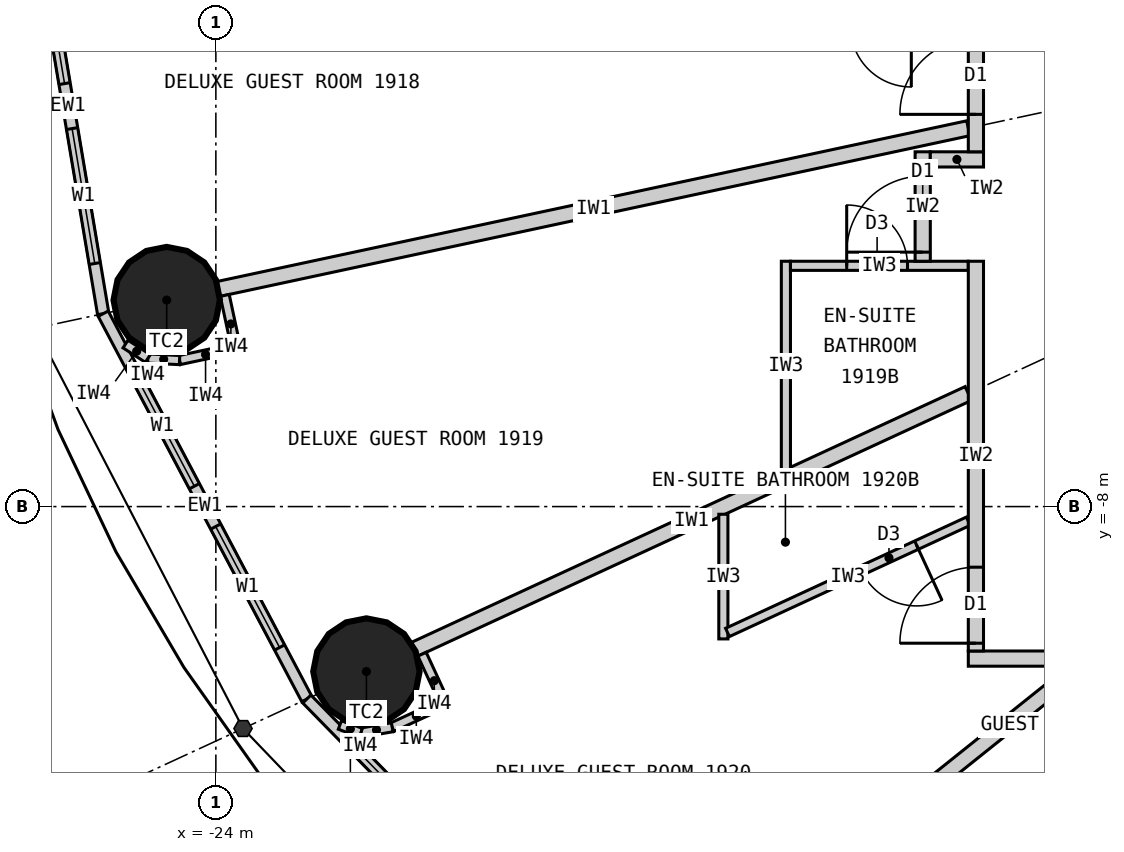
"""IFC4 building model, lengths in metres.
Left out: names, types, materials, properties, quantities, classifications, styles, units other than length and angle.
Written with IfcOpenShell. Run it as: python <this file> out.ifc"""

import sys

from ifc_helpers import new_model, si_unit, direction, frame, frame_2d, origin, origin_2d, place, context, subcontext, project, spatial, rectangle, circle, extrude, element, fill, save


model = new_model("IFC4")
c1 = context("Model", 3, precision=1e-05, world=origin(), true_north=direction((0.0, 1.0)))
c2 = subcontext(c1, "Body", "Model", "MODEL_VIEW")
j1 = project(units=[si_unit("LENGTHUNIT", "METRE"), si_unit("PLANEANGLEUNIT", "RADIAN")], contexts=[c1])
p1 = place(None, origin())
s1 = spatial("IfcSite", under=j1, at=p1, CompositionType="ELEMENT")
p2 = place(p1, origin())
s2 = spatial("IfcBuilding", under=s1, at=p2, CompositionType="ELEMENT")
p3 = place(p2, frame((0.0, 0.0, 77.1)))
s3 = spatial("IfcBuildingStorey", under=s2, at=p3, CompositionType="ELEMENT", Elevation=77.1)
for number, where, z_axis, x_axis in (
    (1, (-24.647, -5.283, 0.0), (0.0, 0.0, 1.0), (1.0, 0.0, 0.0)),
    (2, (-22.019, -10.17, 0.0), (0.0, 0.0, 1.0), (1.0, 0.0, 0.0)),
):
    element("IfcColumn", number, at=place(p3, frame(where, z_axis=z_axis, x_axis=x_axis)), inside=s3, PredefinedType="COLUMN", context=c2, shape_type="SweptSolid", body=[
        extrude(circle(Radius=0.7, at=origin_2d()), origin(), (0.0, 0.0, 1.0), 3.3),
    ])
p4 = place(p3, frame((-26.4, 0.0, 0.0), z_axis=(0.0, 0.0, 1.0), x_axis=(0.165642551694, -0.986185857264, 0.0)))
e3 = element("IfcWall", 3, at=p4, inside=s3, PredefinedType="ELEMENTEDWALL", context=c2, shape_type="SweptSolid", body=[
    extrude(rectangle(XDim=5.539, YDim=0.15, at=frame_2d((2.77, 0.0))), origin(), (0.0, 0.0, 1.0), 3.12),
])
p5 = place(p4, frame((0.669, 0.0, 0.9)))
e4 = element("IfcOpeningElement", 4, at=p5, cuts=e3, PredefinedType="OPENING", context=c2, shape_type="SweptSolid", body=[
    extrude(rectangle(XDim=1.8, YDim=1.9, at=frame_2d((0.9, 0.95))), frame((0.0, 0.085, 0.0), z_axis=(0.0, -1.0, 0.0), x_axis=(1.0, 0.0, 0.0)), (0.0, 0.0, 1.0), 0.17),
])
p6 = place(p4, frame((3.07, 0.0, 0.9)))
e5 = element("IfcOpeningElement", 5, at=p6, cuts=e3, PredefinedType="OPENING", context=c2, shape_type="SweptSolid", body=[
    extrude(rectangle(XDim=1.8, YDim=1.9, at=frame_2d((0.9, 0.95))), frame((0.0, 0.085, 0.0), z_axis=(0.0, -1.0, 0.0), x_axis=(1.0, 0.0, 0.0)), (0.0, 0.0, 1.0), 0.17),
])
p7 = place(p3, frame((-25.482, -5.462, 0.0), z_axis=(0.0, 0.0, 1.0), x_axis=(0.467296867008, -0.884100468321, 0.0)))
e6 = element("IfcWall", 6, at=p7, inside=s3, PredefinedType="ELEMENTEDWALL", context=c2, shape_type="SweptSolid", body=[
    extrude(rectangle(XDim=5.734, YDim=0.15, at=frame_2d((2.867, 0.0))), origin(), (0.0, 0.0, 1.0), 3.12),
])
p8 = place(p7, frame((0.767, 0.0, 0.9)))
e7 = element("IfcOpeningElement", 7, at=p8, cuts=e6, PredefinedType="OPENING", context=c2, shape_type="SweptSolid", body=[
    extrude(rectangle(XDim=1.8, YDim=1.9, at=frame_2d((0.9, 0.95))), frame((0.0, 0.085, 0.0), z_axis=(0.0, -1.0, 0.0), x_axis=(1.0, 0.0, 0.0)), (0.0, 0.0, 1.0), 0.17),
])
p9 = place(p7, frame((3.167, 0.0, 0.9)))
e8 = element("IfcOpeningElement", 8, at=p9, cuts=e6, PredefinedType="OPENING", context=c2, shape_type="SweptSolid", body=[
    extrude(rectangle(XDim=1.8, YDim=1.9, at=frame_2d((0.9, 0.95))), frame((0.0, 0.085, 0.0), z_axis=(0.0, -1.0, 0.0), x_axis=(1.0, 0.0, 0.0)), (0.0, 0.0, 1.0), 0.17),
])
p10 = place(p3, frame((-22.803, -10.532, 0.0), z_axis=(0.0, 0.0, 1.0), x_axis=(0.699602905915, -0.714531856557, 0.0)))
e9 = element("IfcWall", 9, at=p10, inside=s3, PredefinedType="ELEMENTEDWALL", context=c2, shape_type="SweptSolid", body=[
    extrude(rectangle(XDim=6.051, YDim=0.15, at=frame_2d((3.025, 0.0))), origin(), (0.0, 0.0, 1.0), 3.12),
])
p11 = place(p10, frame((0.926, 0.0, 0.9)))
e10 = element("IfcOpeningElement", 10, at=p11, cuts=e9, PredefinedType="OPENING", context=c2, shape_type="SweptSolid", body=[
    extrude(rectangle(XDim=1.8, YDim=1.9, at=frame_2d((0.9, 0.95))), frame((0.0, 0.085, 0.0), z_axis=(0.0, -1.0, 0.0), x_axis=(1.0, 0.0, 0.0)), (0.0, 0.0, 1.0), 0.17),
])
p12 = place(p10, frame((3.325, 0.0, 0.9)))
e11 = element("IfcOpeningElement", 11, at=p12, cuts=e9, PredefinedType="OPENING", context=c2, shape_type="SweptSolid", body=[
    extrude(rectangle(XDim=1.8, YDim=1.9, at=frame_2d((0.9, 0.95))), frame((0.0, 0.085, 0.0), z_axis=(0.0, -1.0, 0.0), x_axis=(1.0, 0.0, 0.0)), (0.0, 0.0, 1.0), 0.17),
])
p13 = place(p3, frame((14.1, -10.0, 0.0), z_axis=(0.0, 0.0, 1.0), x_axis=(-1.0, 0.0, 0.0)))
e12 = element("IfcWall", 12, at=p13, inside=s3, PredefinedType="PARTITIONING", context=c2, shape_type="SweptSolid", body=[
    extrude(rectangle(XDim=28.2, YDim=0.2, at=frame_2d((14.1, 0.0))), origin(), (0.0, 0.0, 1.0), 3.12),
])
p14 = place(p13, frame((24.165, 0.0, 0.0)))
e13 = element("IfcOpeningElement", 13, at=p14, cuts=e12, PredefinedType="OPENING", context=c2, shape_type="SweptSolid", body=[
    extrude(rectangle(XDim=1.0, YDim=2.2, at=frame_2d((0.5, 1.1))), frame((0.0, 0.11, 0.0), z_axis=(0.0, -1.0, 0.0), x_axis=(1.0, 0.0, 0.0)), (0.0, 0.0, 1.0), 0.22),
])
p15 = place(p13, frame((14.923, 0.0, 0.0)))
e14 = element("IfcOpeningElement", 14, at=p15, cuts=e12, PredefinedType="OPENING", context=c2, shape_type="SweptSolid", body=[
    extrude(rectangle(XDim=1.0, YDim=2.2, at=frame_2d((0.5, 1.1))), frame((0.0, 0.11, 0.0), z_axis=(0.0, -1.0, 0.0), x_axis=(1.0, 0.0, 0.0)), (0.0, 0.0, 1.0), 0.22),
])
p16 = place(p13, frame((3.035, 0.0, 0.0)))
e15 = element("IfcOpeningElement", 15, at=p16, cuts=e12, PredefinedType="OPENING", context=c2, shape_type="SweptSolid", body=[
    extrude(rectangle(XDim=1.0, YDim=2.2, at=frame_2d((0.5, 1.1))), frame((0.0, 0.11, 0.0), z_axis=(0.0, -1.0, 0.0), x_axis=(1.0, 0.0, 0.0)), (0.0, 0.0, 1.0), 0.22),
])
p17 = place(p3, frame((-14.1, -3.022, 0.0), z_axis=(0.0, 0.0, 1.0), x_axis=(-0.977790014929, -0.209586943072, 0.0)))
e16 = element("IfcWall", 16, at=p17, inside=s3, PredefinedType="PARTITIONING", context=c2, shape_type="SweptSolid", body=[
    extrude(rectangle(XDim=10.087, YDim=0.2, at=frame_2d((5.043, 0.0))), origin(), (0.0, 0.0, 1.0), 2.32),
])
p18 = place(p3, frame((-14.1, -6.512, 0.0), z_axis=(0.0, 0.0, 1.0), x_axis=(-0.907832871056, -0.419332181247, 0.0)))
e17 = element("IfcWall", 17, at=p18, inside=s3, PredefinedType="PARTITIONING", context=c2, shape_type="SweptSolid", body=[
    extrude(rectangle(XDim=8.023, YDim=0.2, at=frame_2d((4.011, 0.0))), origin(), (0.0, 0.0, 1.0), 2.32),
])
p19 = place(p3, frame((-12.625, -10.1, 0.0), z_axis=(0.0, 0.0, 1.0), x_axis=(-0.780892451574, -0.624665493744, 0.0)))
e18 = element("IfcWall", 18, at=p19, inside=s3, PredefinedType="PARTITIONING", context=c2, shape_type="SweptSolid", body=[
    extrude(rectangle(XDim=6.045, YDim=0.2, at=frame_2d((3.022, 0.0))), origin(), (0.0, 0.0, 1.0), 2.32),
])
p20 = place(p3, frame((-16.5, -7.521, 0.0), z_axis=(0.0, 0.0, 1.0), x_axis=(0.0, 1.0, 0.0)))
e19 = element("IfcWall", 19, at=p20, inside=s3, PredefinedType="PARTITIONING", context=c2, shape_type="SweptSolid", body=[
    extrude(rectangle(XDim=2.749, YDim=0.12, at=frame_2d((1.374, 0.0))), origin(), (0.0, 0.0, 1.0), 3.12),
])
p21 = place(p3, frame((-14.1, -4.833, 0.0), z_axis=(0.0, 0.0, 1.0), x_axis=(-1.0, 0.0, 0.0)))
e20 = element("IfcWall", 20, at=p21, inside=s3, PredefinedType="PARTITIONING", context=c2, shape_type="SweptSolid", body=[
    extrude(rectangle(XDim=2.34, YDim=0.12, at=frame_2d((1.17, 0.0))), origin(), (0.0, 0.0, 1.0), 3.12),
])
p22 = place(p21, frame((0.8, 0.0, 0.0)))
e21 = element("IfcOpeningElement", 21, at=p22, cuts=e20, PredefinedType="OPENING", context=c2, shape_type="SweptSolid", body=[
    extrude(rectangle(XDim=0.8, YDim=2.1, at=frame_2d((0.4, 1.05))), frame((0.0, 0.07, 0.0), z_axis=(0.0, -1.0, 0.0), x_axis=(1.0, 0.0, 0.0)), (0.0, 0.0, 1.0), 0.14),
])
p23 = place(p3, frame((-17.323, -8.101, 0.0), z_axis=(0.0, 0.0, 1.0), x_axis=(0.0, -1.0, 0.0)))
e22 = element("IfcWall", 22, at=p23, inside=s3, PredefinedType="PARTITIONING", context=c2, shape_type="SweptSolid", body=[
    extrude(rectangle(XDim=1.64, YDim=0.12, at=frame_2d((0.82, 0.0))), origin(), (0.0, 0.0, 1.0), 3.12),
])
p24 = place(p3, frame((-14.1, -8.193, 0.0), z_axis=(0.0, 0.0, 1.0), x_axis=(-0.907836493557, -0.419324338628, 0.0)))
e23 = element("IfcWall", 23, at=p24, inside=s3, PredefinedType="PARTITIONING", context=c2, shape_type="SweptSolid", body=[
    extrude(rectangle(XDim=3.49, YDim=0.12, at=frame_2d((1.745, 0.0))), origin(), (0.0, 0.0, 1.0), 3.12),
])
p25 = place(p24, frame((0.75, 0.0, 0.0)))
e24 = element("IfcOpeningElement", 24, at=p25, cuts=e23, PredefinedType="OPENING", context=c2, shape_type="SweptSolid", body=[
    extrude(rectangle(XDim=0.8, YDim=2.1, at=frame_2d((0.4, 1.05))), frame((0.0, 0.07, 0.0), z_axis=(0.0, -1.0, 0.0), x_axis=(1.0, 0.0, 0.0)), (0.0, 0.0, 1.0), 0.14),
])
p26 = place(p3, frame((-14.7, -3.333, 0.0), z_axis=(0.0, 0.0, 1.0), x_axis=(0.0, -1.0, 0.0)))
e25 = element("IfcWall", 25, at=p26, inside=s3, PredefinedType="PARTITIONING", context=c2, shape_type="SweptSolid", body=[
    extrude(rectangle(XDim=1.44, YDim=0.2, at=frame_2d((0.72, 0.0))), origin(), (0.0, 0.0, 1.0), 3.12),
])
p27 = place(p26, frame((0.32, 0.0, 0.0)))
e26 = element("IfcOpeningElement", 26, at=p27, cuts=e25, PredefinedType="OPENING", context=c2, shape_type="SweptSolid", body=[
    extrude(rectangle(XDim=1.0, YDim=2.2, at=frame_2d((0.5, 1.1))), frame((0.0, 0.11, 0.0), z_axis=(0.0, -1.0, 0.0), x_axis=(1.0, 0.0, 0.0)), (0.0, 0.0, 1.0), 0.22),
])
p28 = place(p3, frame((-13.9, -3.433, 0.0), z_axis=(0.0, 0.0, 1.0), x_axis=(-1.0, 0.0, 0.0)))
e27 = element("IfcWall", 27, at=p28, inside=s3, PredefinedType="PARTITIONING", context=c2, shape_type="SweptSolid", body=[
    extrude(rectangle(XDim=0.7, YDim=0.2, at=frame_2d((0.35, 0.0))), origin(), (0.0, 0.0, 1.0), 2.32),
])
p29 = place(p3, frame((-14.0, 3.333, 0.0), z_axis=(0.0, 0.0, 1.0), x_axis=(0.0, -1.0, 0.0)))
e28 = element("IfcWall", 28, at=p29, inside=s3, PredefinedType="PARTITIONING", context=c2, shape_type="SweptSolid", body=[
    extrude(rectangle(XDim=6.665, YDim=0.2, at=frame_2d((3.333, 0.0))), origin(), (0.0, 0.0, 1.0), 3.12),
])
p30 = place(p29, frame((2.15, 0.0, 0.0)))
e29 = element("IfcOpeningElement", 29, at=p30, cuts=e28, PredefinedType="OPENING", context=c2, shape_type="SweptSolid", body=[
    extrude(rectangle(XDim=1.0, YDim=2.2, at=frame_2d((0.5, 1.1))), frame((0.0, 0.11, 0.0), z_axis=(0.0, -1.0, 0.0), x_axis=(1.0, 0.0, 0.0)), (0.0, 0.0, 1.0), 0.22),
])
p31 = place(p29, frame((5.173, 0.0, 0.0)))
e30 = element("IfcOpeningElement", 30, at=p31, cuts=e28, PredefinedType="OPENING", context=c2, shape_type="SweptSolid", body=[
    extrude(rectangle(XDim=1.0, YDim=2.2, at=frame_2d((0.5, 1.1))), frame((0.0, 0.11, 0.0), z_axis=(0.0, -1.0, 0.0), x_axis=(1.0, 0.0, 0.0)), (0.0, 0.0, 1.0), 0.22),
])
p32 = place(p3, frame((-14.0, -4.772, 0.0), z_axis=(0.0, 0.0, 1.0), x_axis=(0.0, -1.0, 0.0)))
e31 = element("IfcWall", 31, at=p32, inside=s3, PredefinedType="PARTITIONING", context=c2, shape_type="SweptSolid", body=[
    extrude(rectangle(XDim=5.127, YDim=0.2, at=frame_2d((2.564, 0.0))), origin(), (0.0, 0.0, 1.0), 3.12),
])
p33 = place(p32, frame((4.025, 0.0, 0.0)))
e32 = element("IfcOpeningElement", 32, at=p33, cuts=e31, PredefinedType="OPENING", context=c2, shape_type="SweptSolid", body=[
    extrude(rectangle(XDim=1.0, YDim=2.2, at=frame_2d((0.5, 1.1))), frame((0.0, 0.11, 0.0), z_axis=(0.0, -1.0, 0.0), x_axis=(1.0, 0.0, 0.0)), (0.0, 0.0, 1.0), 0.22),
])
p34 = place(p3, frame((-23.883, -5.222, 0.0), z_axis=(0.0, 0.0, 1.0), x_axis=(0.209311842415, -0.977848941619, 0.0)))
e33 = element("IfcWall", 33, at=p34, inside=s3, PredefinedType="PARTITIONING", context=c2, shape_type="SweptSolid", body=[
    extrude(rectangle(XDim=0.768, YDim=0.12, at=frame_2d((0.384, 0.0))), origin(), (0.0, 0.0, 1.0), 3.12),
])
p35 = place(p3, frame((-23.793, -5.926, 0.0), z_axis=(0.0, 0.0, 1.0), x_axis=(-0.977792206673, -0.209576717621, 0.0)))
e34 = element("IfcWall", 34, at=p35, inside=s3, PredefinedType="PARTITIONING", context=c2, shape_type="SweptSolid", body=[
    extrude(rectangle(XDim=0.7, YDim=0.12, at=frame_2d((0.35, 0.0))), origin(), (0.0, 0.0, 1.0), 3.12),
])
p36 = place(p3, frame((-24.478, -6.073, 0.0), z_axis=(0.0, 0.0, 1.0), x_axis=(-0.998708262812, 0.05081147302, 0.0)))
e35 = element("IfcWall", 35, at=p36, inside=s3, PredefinedType="PARTITIONING", context=c2, shape_type="SweptSolid", body=[
    extrude(rectangle(XDim=0.418, YDim=0.12, at=frame_2d((0.209, 0.0))), origin(), (0.0, 0.0, 1.0), 3.12),
])
p37 = place(p3, frame((-24.895, -6.052, 0.0), z_axis=(0.0, 0.0, 1.0), x_axis=(-0.839495197275, 0.54336710772, 0.0)))
e36 = element("IfcWall", 36, at=p37, inside=s3, PredefinedType="PARTITIONING", context=c2, shape_type="SweptSolid", body=[
    extrude(rectangle(XDim=0.35, YDim=0.12, at=frame_2d((0.175, 0.0))), origin(), (0.0, 0.0, 1.0), 3.12),
])
p38 = place(p3, frame((-21.287, -9.942, 0.0), z_axis=(0.0, 0.0, 1.0), x_axis=(0.419259891039, -0.907866258744, 0.0)))
e37 = element("IfcWall", 37, at=p38, inside=s3, PredefinedType="PARTITIONING", context=c2, shape_type="SweptSolid", body=[
    extrude(rectangle(XDim=0.768, YDim=0.12, at=frame_2d((0.384, 0.0))), origin(), (0.0, 0.0, 1.0), 3.12),
])
p39 = place(p3, frame((-21.045, -10.61, 0.0), z_axis=(0.0, 0.0, 1.0), x_axis=(-0.907877701396, -0.419235112208, 0.0)))
e38 = element("IfcWall", 38, at=p39, inside=s3, PredefinedType="PARTITIONING", context=c2, shape_type="SweptSolid", body=[
    extrude(rectangle(XDim=0.7, YDim=0.12, at=frame_2d((0.35, 0.0))), origin(), (0.0, 0.0, 1.0), 3.12),
])
p40 = place(p3, frame((-21.68, -10.903, 0.0), z_axis=(0.0, 0.0, 1.0), x_axis=(-0.985446622073, -0.169985161247, 0.0)))
e39 = element("IfcWall", 39, at=p40, inside=s3, PredefinedType="PARTITIONING", context=c2, shape_type="SweptSolid", body=[
    extrude(rectangle(XDim=0.418, YDim=0.12, at=frame_2d((0.209, 0.0))), origin(), (0.0, 0.0, 1.0), 3.12),
])
p41 = place(p3, frame((-22.092, -10.974, 0.0), z_axis=(0.0, 0.0, 1.0), x_axis=(-0.938428160676, 0.345474437912, 0.0)))
e40 = element("IfcWall", 40, at=p41, inside=s3, PredefinedType="PARTITIONING", context=c2, shape_type="SweptSolid", body=[
    extrude(rectangle(XDim=0.294, YDim=0.12, at=frame_2d((0.147, 0.0))), origin(), (0.0, 0.0, 1.0), 3.12),
])
p42 = place(p5, origin())
e41 = element("IfcWindow", 41, at=p42, inside=s3, PartitioningType="SINGLE_PANEL", PredefinedType="WINDOW", context=c2, shape_type="SweptSolid", body=[
    extrude(rectangle(XDim=1.8, YDim=1.9, at=frame_2d((0.9, 0.95))), frame((0.0, 0.03, 0.0), z_axis=(0.0, -1.0, 0.0), x_axis=(1.0, 0.0, 0.0)), (0.0, 0.0, 1.0), 0.06),
])
fill(e4, e41)
p43 = place(p6, origin())
e42 = element("IfcWindow", 42, at=p43, inside=s3, PartitioningType="SINGLE_PANEL", PredefinedType="WINDOW", context=c2, shape_type="SweptSolid", body=[
    extrude(rectangle(XDim=1.8, YDim=1.9, at=frame_2d((0.9, 0.95))), frame((0.0, 0.03, 0.0), z_axis=(0.0, -1.0, 0.0), x_axis=(1.0, 0.0, 0.0)), (0.0, 0.0, 1.0), 0.06),
])
fill(e5, e42)
p44 = place(p8, origin())
e43 = element("IfcWindow", 43, at=p44, inside=s3, PartitioningType="SINGLE_PANEL", PredefinedType="WINDOW", context=c2, shape_type="SweptSolid", body=[
    extrude(rectangle(XDim=1.8, YDim=1.9, at=frame_2d((0.9, 0.95))), frame((0.0, 0.03, 0.0), z_axis=(0.0, -1.0, 0.0), x_axis=(1.0, 0.0, 0.0)), (0.0, 0.0, 1.0), 0.06),
])
fill(e7, e43)
p45 = place(p9, origin())
e44 = element("IfcWindow", 44, at=p45, inside=s3, PartitioningType="SINGLE_PANEL", PredefinedType="WINDOW", context=c2, shape_type="SweptSolid", body=[
    extrude(rectangle(XDim=1.8, YDim=1.9, at=frame_2d((0.9, 0.95))), frame((0.0, 0.03, 0.0), z_axis=(0.0, -1.0, 0.0), x_axis=(1.0, 0.0, 0.0)), (0.0, 0.0, 1.0), 0.06),
])
fill(e8, e44)
p46 = place(p11, origin())
e45 = element("IfcWindow", 45, at=p46, inside=s3, PartitioningType="SINGLE_PANEL", PredefinedType="WINDOW", context=c2, shape_type="SweptSolid", body=[
    extrude(rectangle(XDim=1.8, YDim=1.9, at=frame_2d((0.9, 0.95))), frame((0.0, 0.03, 0.0), z_axis=(0.0, -1.0, 0.0), x_axis=(1.0, 0.0, 0.0)), (0.0, 0.0, 1.0), 0.06),
])
fill(e10, e45)
p47 = place(p31, origin())
e46 = element("IfcDoor", 46, at=p47, inside=s3, OperationType="SINGLE_SWING_RIGHT", PredefinedType="DOOR", context=c2, shape_type="SweptSolid", body=[
    extrude(rectangle(XDim=1.0, YDim=2.2, at=frame_2d((0.5, 1.1))), frame((0.0, 0.025, 0.0), z_axis=(0.0, -1.0, 0.0), x_axis=(1.0, 0.0, 0.0)), (0.0, 0.0, 1.0), 0.05),
])
fill(e30, e46)
p48 = place(p22, origin())
e47 = element("IfcDoor", 47, at=p48, inside=s3, OperationType="SINGLE_SWING_RIGHT", PredefinedType="DOOR", context=c2, shape_type="SweptSolid", body=[
    extrude(rectangle(XDim=0.8, YDim=2.1, at=frame_2d((0.4, 1.05))), frame((0.0, 0.025, 0.0), z_axis=(0.0, -1.0, 0.0), x_axis=(1.0, 0.0, 0.0)), (0.0, 0.0, 1.0), 0.05),
])
fill(e21, e47)
p49 = place(p27, origin())
e48 = element("IfcDoor", 48, at=p49, inside=s3, OperationType="SINGLE_SWING_RIGHT", PredefinedType="DOOR", context=c2, shape_type="SweptSolid", body=[
    extrude(rectangle(XDim=1.0, YDim=2.2, at=frame_2d((0.5, 1.1))), frame((0.0, 0.025, 0.0), z_axis=(0.0, -1.0, 0.0), x_axis=(1.0, 0.0, 0.0)), (0.0, 0.0, 1.0), 0.05),
])
fill(e26, e48)
p50 = place(p25, origin())
e49 = element("IfcDoor", 49, at=p50, inside=s3, OperationType="SINGLE_SWING_LEFT", PredefinedType="DOOR", context=c2, shape_type="SweptSolid", body=[
    extrude(rectangle(XDim=0.8, YDim=2.1, at=frame_2d((0.4, 1.05))), frame((0.0, 0.025, 0.0), z_axis=(0.0, -1.0, 0.0), x_axis=(1.0, 0.0, 0.0)), (0.0, 0.0, 1.0), 0.05),
])
fill(e24, e49)
p51 = place(p33, origin())
e50 = element("IfcDoor", 50, at=p51, inside=s3, OperationType="SINGLE_SWING_RIGHT", PredefinedType="DOOR", context=c2, shape_type="SweptSolid", body=[
    extrude(rectangle(XDim=1.0, YDim=2.2, at=frame_2d((0.5, 1.1))), frame((0.0, 0.025, 0.0), z_axis=(0.0, -1.0, 0.0), x_axis=(1.0, 0.0, 0.0)), (0.0, 0.0, 1.0), 0.05),
])
fill(e32, e50)
save(model, sys.argv[1])
